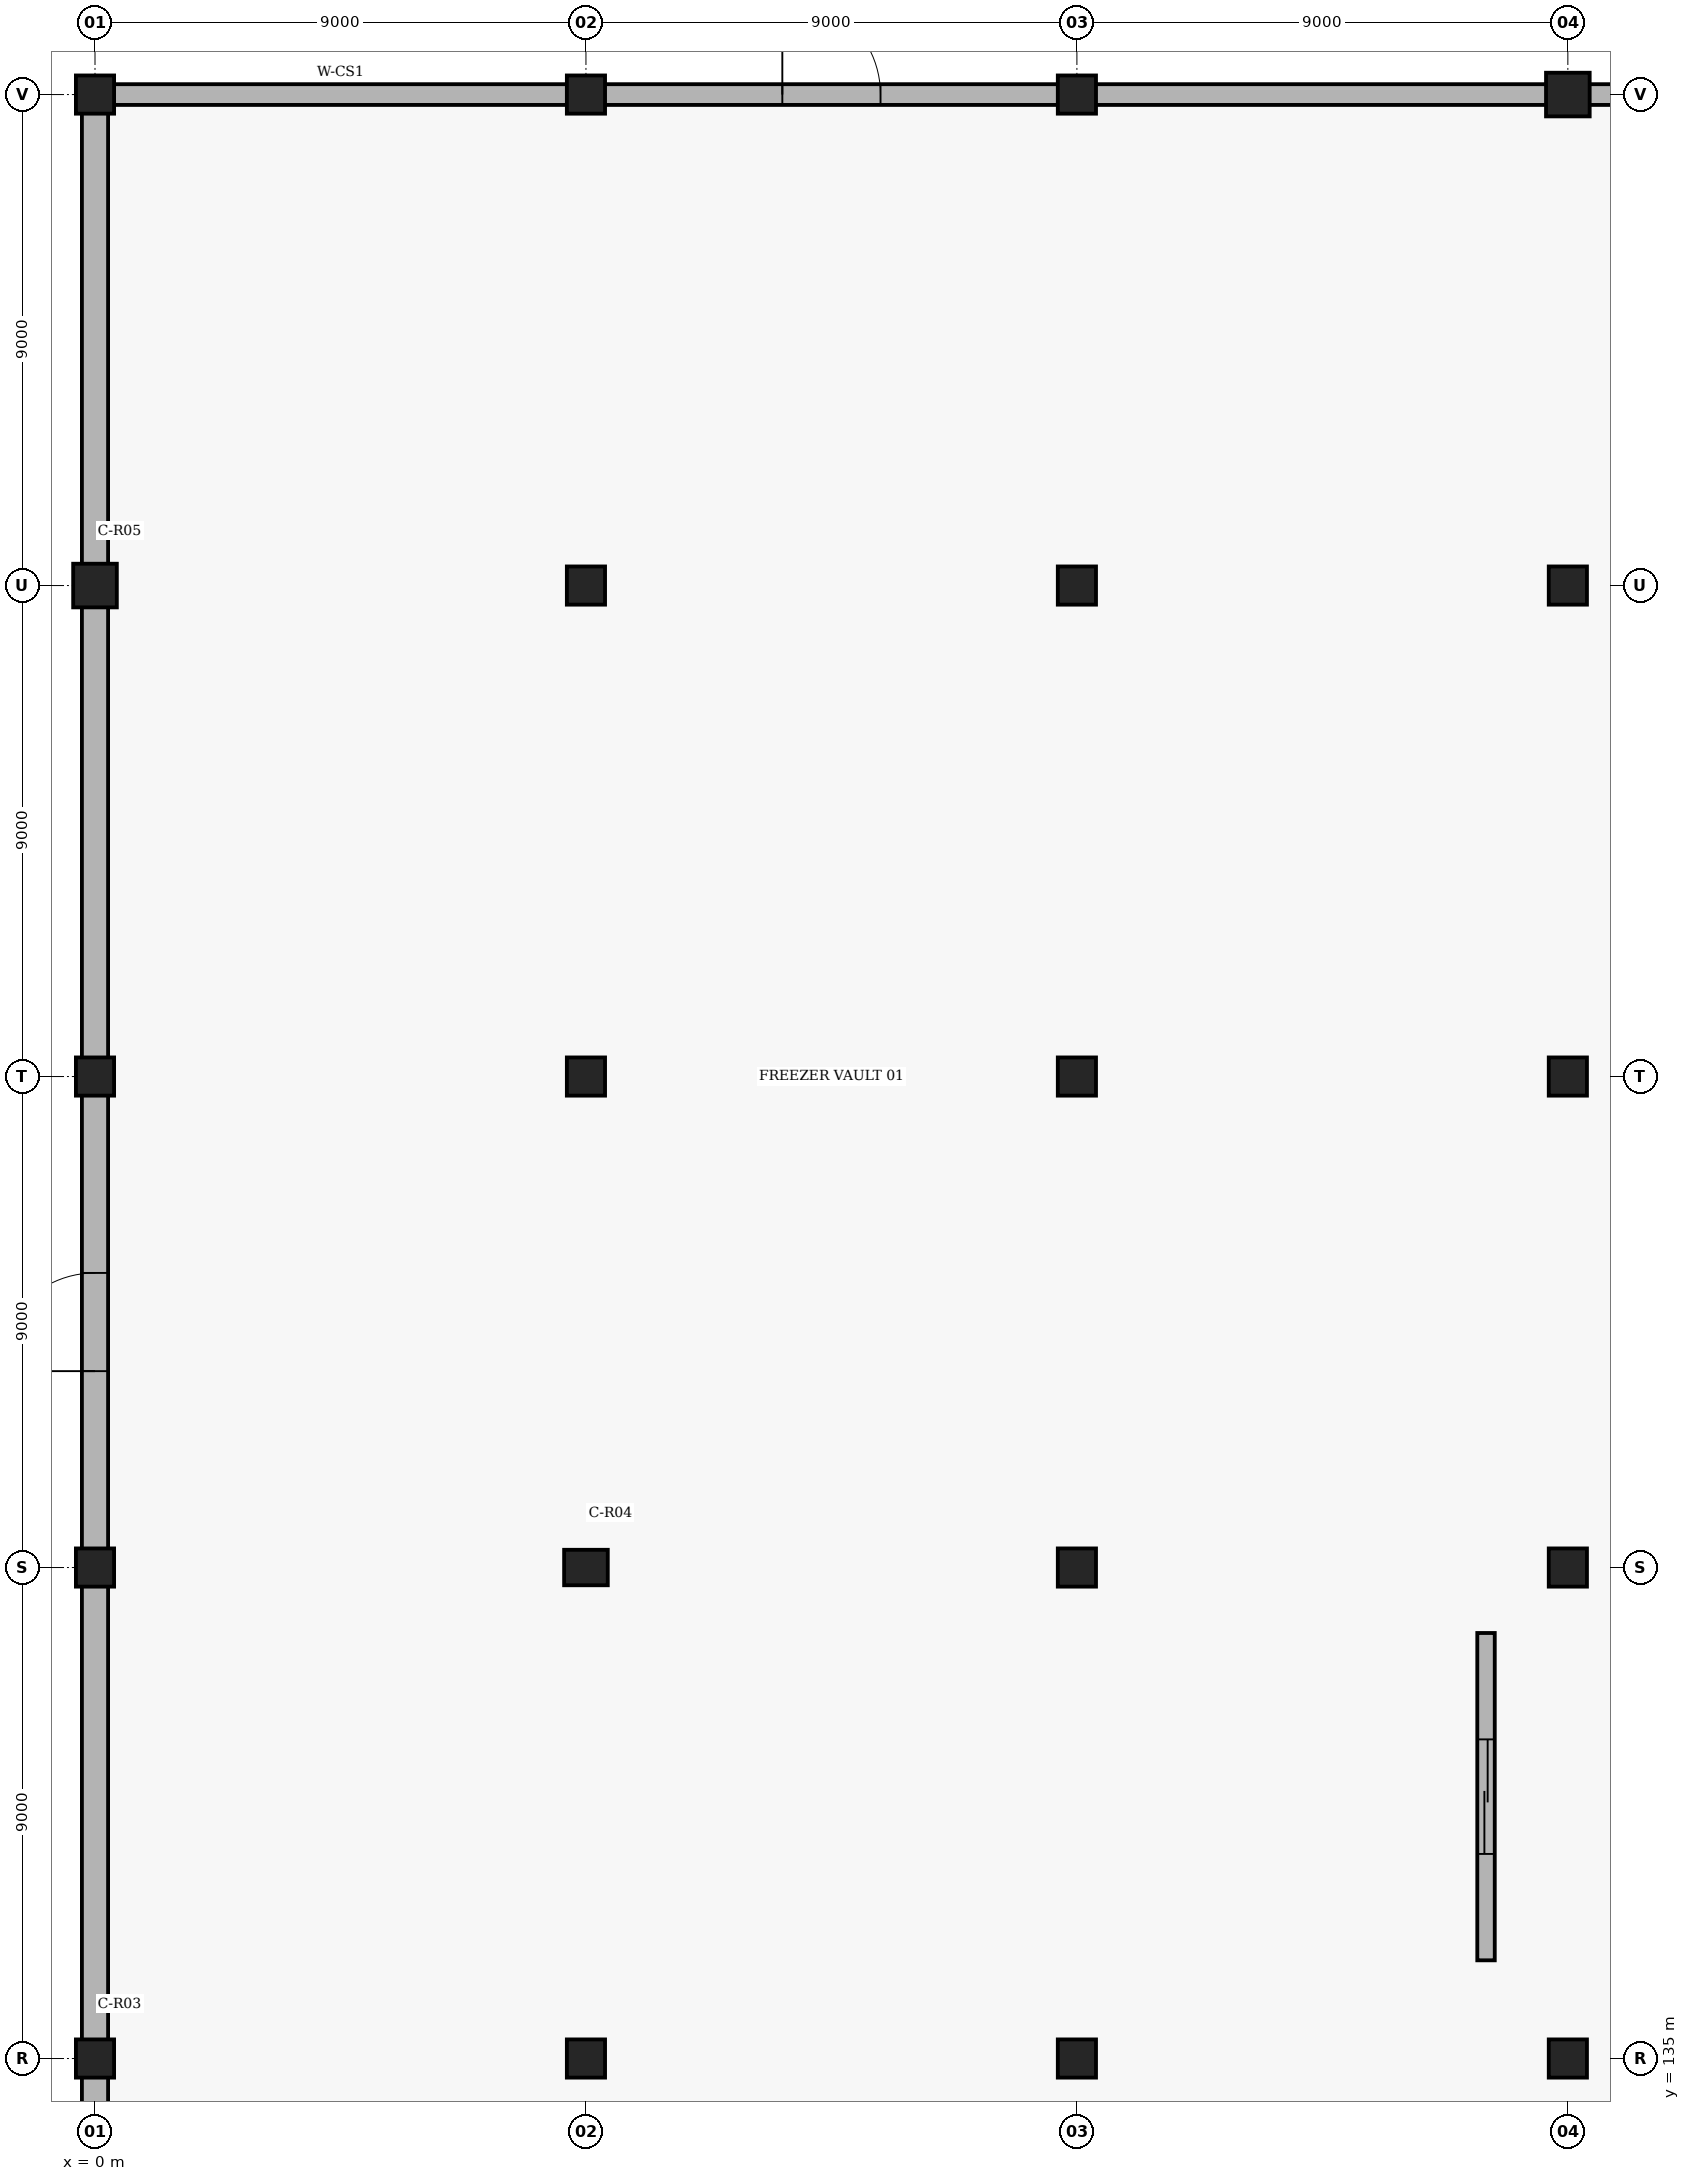
"""IFC4 building model, lengths in metres.
Left out: names, types, materials, properties, quantities, classifications, styles, units other than length and angle.
Written with IfcOpenShell. Run it as: python <this file> out.ifc"""

import sys

from ifc_helpers import new_model, si_unit, direction, frame, frame_2d, origin, origin_2d, place, context, subcontext, project, spatial, rectangle, circle, extrude, element, fill, save


model = new_model("IFC4")
c1 = context("Model", 3, precision=1e-05, world=origin(), true_north=direction((0.0, 1.0)))
c2 = subcontext(c1, "Body", "Model", "MODEL_VIEW")
j1 = project(units=[si_unit("LENGTHUNIT", "METRE"), si_unit("PLANEANGLEUNIT", "RADIAN")], contexts=[c1])
p1 = place(None, origin())
s1 = spatial("IfcSite", under=j1, at=p1, CompositionType="ELEMENT")
p2 = place(p1, origin())
s2 = spatial("IfcBuilding", under=s1, at=p2, CompositionType="ELEMENT")
p3 = place(p2, origin())
s3 = spatial("IfcBuildingStorey", under=s2, at=p3, CompositionType="ELEMENT", Elevation=0.0)
for number, where, z_axis, x_axis in (
    (1, (0.0, 135.0, 0.0), (0.0, 0.0, 1.0), (1.0, 0.0, 0.0)),
    (2, (0.0, 144.0, 0.0), (0.0, 0.0, 1.0), (1.0, 0.0, 0.0)),
    (3, (0.0, 153.0, 0.0), (0.0, 0.0, 1.0), (1.0, 0.0, 0.0)),
):
    element("IfcColumn", number, at=place(p3, frame(where, z_axis=z_axis, x_axis=x_axis)), inside=s3, PredefinedType="COLUMN", context=c2, shape_type="SweptSolid", body=[
        extrude(rectangle(XDim=0.7, YDim=0.7, at=origin_2d()), origin(), (0.0, 0.0, 1.0), 5.4),
    ])
p4 = place(p3, frame((0.0, 162.0, 0.0), z_axis=(0.0, 0.0, 1.0), x_axis=(1.0, 0.0, 0.0)))
e4 = element("IfcColumn", 4, at=p4, inside=s3, PredefinedType="COLUMN", context=c2, shape_type="SweptSolid", body=[
    extrude(circle(Radius=0.4, at=origin_2d()), origin(), (0.0, 0.0, 1.0), 5.4),
])
for number, where, z_axis, x_axis in (
    (5, (0.0, 171.0, 0.0), (0.0, 0.0, 1.0), (1.0, 0.0, 0.0)),
    (6, (9.0, 135.0, 0.0), (0.0, 0.0, 1.0), (1.0, 0.0, 0.0)),
):
    element("IfcColumn", number, at=place(p3, frame(where, z_axis=z_axis, x_axis=x_axis)), inside=s3, PredefinedType="COLUMN", context=c2, shape_type="SweptSolid", body=[
        extrude(rectangle(XDim=0.7, YDim=0.7, at=origin_2d()), origin(), (0.0, 0.0, 1.0), 5.4),
    ])
p5 = place(p3, frame((9.0, 144.0, 0.0), z_axis=(0.0, 0.0, 1.0), x_axis=(1.0, 0.0, 0.0)))
e7 = element("IfcColumn", 7, at=p5, inside=s3, PredefinedType="COLUMN", context=c2, shape_type="SweptSolid", body=[
    extrude(rectangle(XDim=0.8, YDim=0.65, at=origin_2d()), origin(), (0.0, 0.0, 1.0), 5.4),
])
for number, where, z_axis, x_axis in (
    (8, (9.0, 153.0, 0.0), (0.0, 0.0, 1.0), (1.0, 0.0, 0.0)),
    (9, (9.0, 162.0, 0.0), (0.0, 0.0, 1.0), (1.0, 0.0, 0.0)),
    (10, (9.0, 171.0, 0.0), (0.0, 0.0, 1.0), (1.0, 0.0, 0.0)),
    (11, (18.0, 135.0, 0.0), (0.0, 0.0, 1.0), (1.0, 0.0, 0.0)),
    (12, (18.0, 144.0, 0.0), (0.0, 0.0, 1.0), (1.0, 0.0, 0.0)),
    (13, (18.0, 153.0, 0.0), (0.0, 0.0, 1.0), (1.0, 0.0, 0.0)),
    (14, (18.0, 162.0, 0.0), (0.0, 0.0, 1.0), (1.0, 0.0, 0.0)),
    (15, (18.0, 171.0, 0.0), (0.0, 0.0, 1.0), (1.0, 0.0, 0.0)),
    (16, (27.0, 135.0, 0.0), (0.0, 0.0, 1.0), (1.0, 0.0, 0.0)),
    (17, (27.0, 144.0, 0.0), (0.0, 0.0, 1.0), (1.0, 0.0, 0.0)),
    (18, (27.0, 153.0, 0.0), (0.0, 0.0, 1.0), (1.0, 0.0, 0.0)),
    (19, (27.0, 162.0, 0.0), (0.0, 0.0, 1.0), (1.0, 0.0, 0.0)),
):
    element("IfcColumn", number, at=place(p3, frame(where, z_axis=z_axis, x_axis=x_axis)), inside=s3, PredefinedType="COLUMN", context=c2, shape_type="SweptSolid", body=[
        extrude(rectangle(XDim=0.7, YDim=0.7, at=origin_2d()), origin(), (0.0, 0.0, 1.0), 5.4),
    ])
p6 = place(p3, frame((27.0, 171.0, 0.0), z_axis=(0.0, 0.0, 1.0), x_axis=(1.0, 0.0, 0.0)))
e20 = element("IfcColumn", 20, at=p6, inside=s3, PredefinedType="COLUMN", context=c2, shape_type="SweptSolid", body=[
    extrude(circle(Radius=0.4, at=origin_2d()), origin(), (0.0, 0.0, 1.0), 5.4),
])
p7 = place(p3, frame((0.06, 171.0, 0.0), z_axis=(0.0, 0.0, 1.0), x_axis=(1.0, 0.0, 0.0)))
e21 = element("IfcWall", 21, at=p7, inside=s3, PredefinedType="SOLIDWALL", context=c2, shape_type="SweptSolid", body=[
    extrude(rectangle(XDim=8.88, YDim=0.38, at=frame_2d((4.44, 0.0))), origin(), (0.0, 0.0, 1.0), 4.55),
])
p8 = place(p3, frame((9.06, 171.0, 0.0), z_axis=(0.0, 0.0, 1.0), x_axis=(1.0, 0.0, 0.0)))
e22 = element("IfcWall", 22, at=p8, inside=s3, PredefinedType="SOLIDWALL", context=c2, shape_type="SweptSolid", body=[
    extrude(rectangle(XDim=8.88, YDim=0.38, at=frame_2d((4.44, 0.0))), origin(), (0.0, 0.0, 1.0), 4.55),
])
p9 = place(p8, frame((3.54, 0.0, 0.0)))
e23 = element("IfcOpeningElement", 23, at=p9, cuts=e22, PredefinedType="OPENING", context=c2, shape_type="SweptSolid", body=[
    extrude(rectangle(XDim=1.8, YDim=2.15, at=frame_2d((0.9, 1.075))), frame((0.0, 0.2, 0.0), z_axis=(0.0, -1.0, 0.0), x_axis=(1.0, 0.0, 0.0)), (0.0, 0.0, 1.0), 0.4),
])
for number, where, z_axis, x_axis in (
    (24, (18.06, 171.0, 0.0), (0.0, 0.0, 1.0), (1.0, 0.0, 0.0)),
    (25, (27.06, 171.0, 0.0), (0.0, 0.0, 1.0), (1.0, 0.0, 0.0)),
):
    element("IfcWall", number, at=place(p3, frame(where, z_axis=z_axis, x_axis=x_axis)), inside=s3, PredefinedType="SOLIDWALL", context=c2, shape_type="SweptSolid", body=[
        extrude(rectangle(XDim=8.88, YDim=0.38, at=frame_2d((4.44, 0.0))), origin(), (0.0, 0.0, 1.0), 4.55),
    ])
for number, where, z_axis, x_axis in (
    (26, (0.0, 126.06, 0.0), (0.0, 0.0, 1.0), (0.0, 1.0, 0.0)),
    (27, (0.0, 135.06, 0.0), (0.0, 0.0, 1.0), (0.0, 1.0, 0.0)),
):
    element("IfcWall", number, at=place(p3, frame(where, z_axis=z_axis, x_axis=x_axis)), inside=s3, PredefinedType="SOLIDWALL", context=c2, shape_type="SweptSolid", body=[
        extrude(rectangle(XDim=8.88, YDim=0.48, at=frame_2d((4.44, 0.0))), origin(), (0.0, 0.0, 1.0), 4.55),
    ])
p10 = place(p3, frame((0.0, 144.06, 0.0), z_axis=(0.0, 0.0, 1.0), x_axis=(0.0, 1.0, 0.0)))
e28 = element("IfcWall", 28, at=p10, inside=s3, PredefinedType="SOLIDWALL", context=c2, shape_type="SweptSolid", body=[
    extrude(rectangle(XDim=8.88, YDim=0.48, at=frame_2d((4.44, 0.0))), origin(), (0.0, 0.0, 1.0), 4.55),
])
p11 = place(p10, frame((3.54, 0.0, 0.0)))
e29 = element("IfcOpeningElement", 29, at=p11, cuts=e28, PredefinedType="OPENING", context=c2, shape_type="SweptSolid", body=[
    extrude(rectangle(XDim=1.8, YDim=2.15, at=frame_2d((0.9, 1.075))), frame((0.0, 0.25, 0.0), z_axis=(0.0, -1.0, 0.0), x_axis=(1.0, 0.0, 0.0)), (0.0, 0.0, 1.0), 0.5),
])
for number, where, z_axis, x_axis in (
    (30, (0.0, 153.06, 0.0), (0.0, 0.0, 1.0), (0.0, 1.0, 0.0)),
    (31, (0.0, 162.06, 0.0), (0.0, 0.0, 1.0), (0.0, 1.0, 0.0)),
):
    element("IfcWall", number, at=place(p3, frame(where, z_axis=z_axis, x_axis=x_axis)), inside=s3, PredefinedType="SOLIDWALL", context=c2, shape_type="SweptSolid", body=[
        extrude(rectangle(XDim=8.88, YDim=0.48, at=frame_2d((4.44, 0.0))), origin(), (0.0, 0.0, 1.0), 4.55),
    ])
p12 = place(p3, frame((25.5, 136.8, 0.0), z_axis=(0.0, 0.0, 1.0), x_axis=(0.0, 1.0, 0.0)))
e32 = element("IfcWall", 32, at=p12, inside=s3, PredefinedType="PARTITIONING", context=c2, shape_type="SweptSolid", body=[
    extrude(rectangle(XDim=6.0, YDim=0.32, at=frame_2d((3.0, 0.0))), origin(), (0.0, 0.0, 1.0), 4.3),
])
p13 = place(p12, frame((1.95, 0.0, 0.0)))
e33 = element("IfcOpeningElement", 33, at=p13, cuts=e32, PredefinedType="OPENING", context=c2, shape_type="SweptSolid", body=[
    extrude(rectangle(XDim=2.1, YDim=2.6, at=frame_2d((1.05, 1.3))), frame((0.0, 0.17, 0.0), z_axis=(0.0, -1.0, 0.0), x_axis=(1.0, 0.0, 0.0)), (0.0, 0.0, 1.0), 0.34),
])
p14 = place(p9, origin())
e34 = element("IfcDoor", 34, at=p14, inside=s3, OperationType="DOUBLE_DOOR_SINGLE_SWING", PredefinedType="DOOR", context=c2, shape_type="SweptSolid", body=[
    extrude(rectangle(XDim=1.8, YDim=2.15, at=frame_2d((0.9, 1.075))), frame((0.0, 0.025, 0.0), z_axis=(0.0, -1.0, 0.0), x_axis=(1.0, 0.0, 0.0)), (0.0, 0.0, 1.0), 0.05),
])
fill(e23, e34)
p15 = place(p11, origin())
e35 = element("IfcDoor", 35, at=p15, inside=s3, OperationType="DOUBLE_DOOR_SINGLE_SWING", PredefinedType="DOOR", context=c2, shape_type="SweptSolid", body=[
    extrude(rectangle(XDim=1.8, YDim=2.15, at=frame_2d((0.9, 1.075))), frame((0.0, 0.025, 0.0), z_axis=(0.0, -1.0, 0.0), x_axis=(1.0, 0.0, 0.0)), (0.0, 0.0, 1.0), 0.05),
])
fill(e29, e35)
p16 = place(p13, origin())
e36 = element("IfcDoor", 36, at=p16, inside=s3, OperationType="SLIDING_TO_LEFT", PredefinedType="DOOR", context=c2, shape_type="SweptSolid", body=[
    extrude(rectangle(XDim=2.1, YDim=2.6, at=frame_2d((1.05, 1.3))), frame((0.0, 0.025, 0.0), z_axis=(0.0, -1.0, 0.0), x_axis=(1.0, 0.0, 0.0)), (0.0, 0.0, 1.0), 0.05),
])
fill(e33, e36)
save(model, sys.argv[1])
